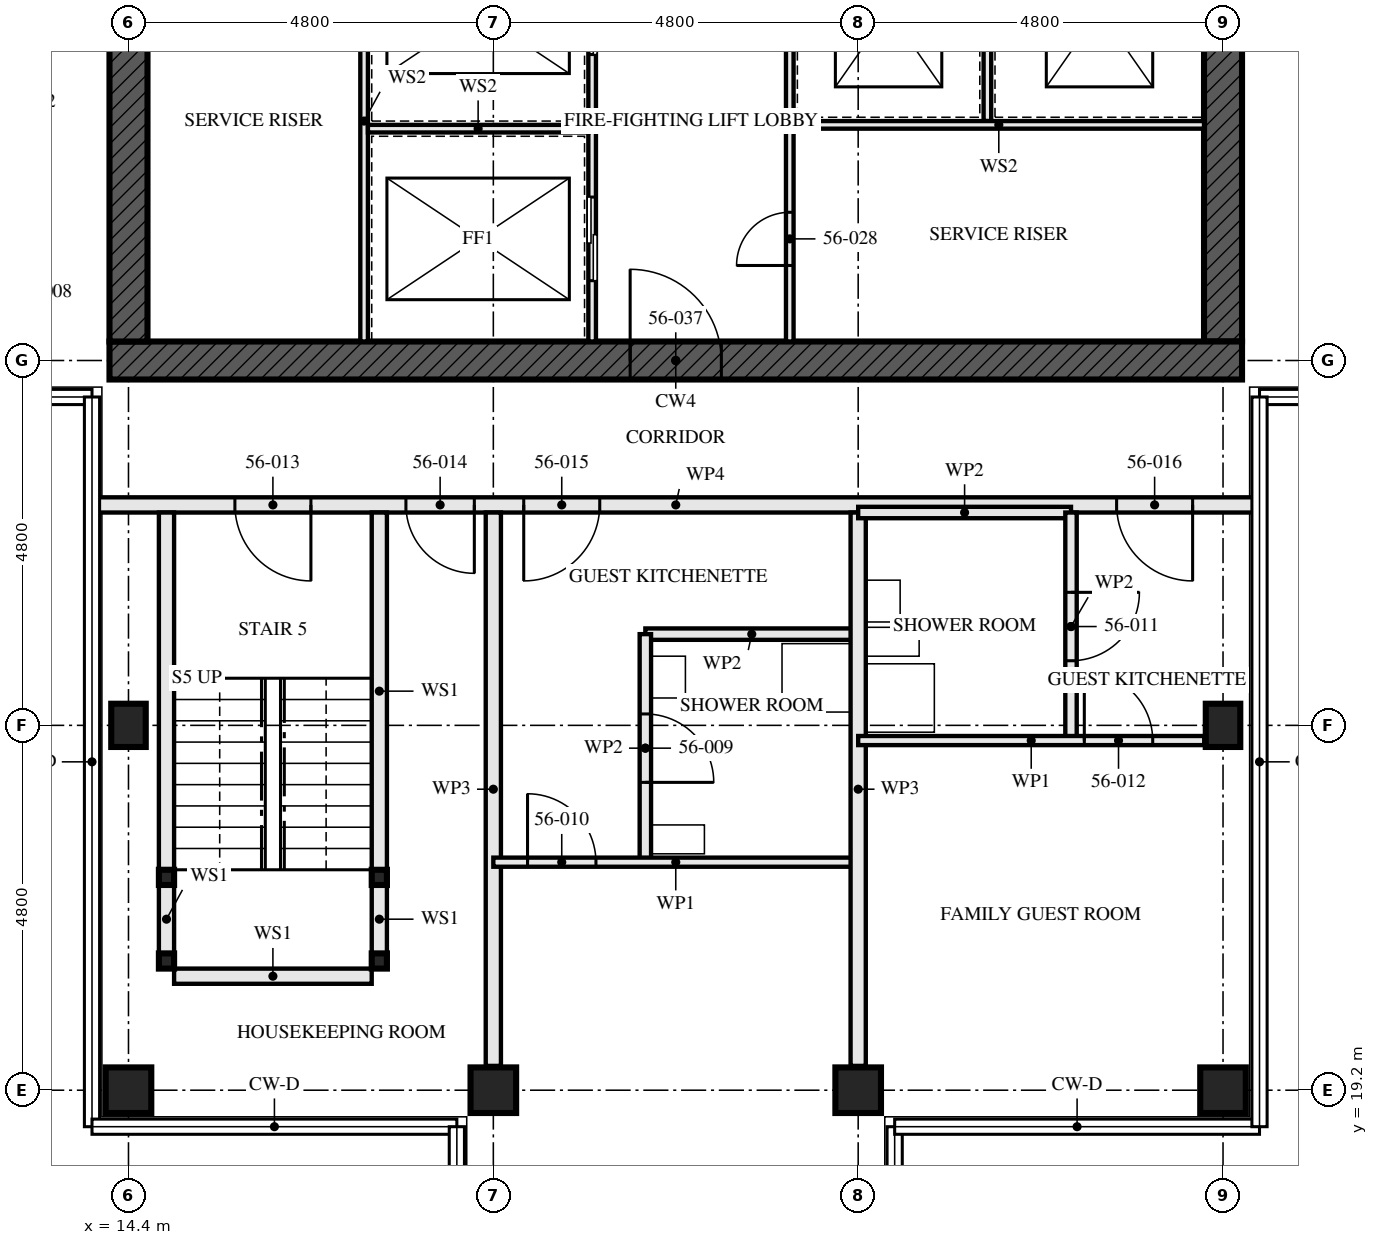
"""IFC4 building model, lengths in metres.
Left out: names, types, materials, properties, quantities, classifications, styles, units other than length and angle.
Written with IfcOpenShell. Run it as: python <this file> out.ifc"""

import sys

from ifc_helpers import new_model, si_unit, direction, frame, frame_2d, origin, origin_2d, place, context, subcontext, project, spatial, rectangle, hollow_rectangle, i_section, extrude, element, fill, save


model = new_model("IFC4")
c1 = context("Model", 3, precision=1e-05, world=origin(), true_north=direction((0.0, 1.0)))
c2 = subcontext(c1, "Body", "Model", "MODEL_VIEW")
j1 = project(units=[si_unit("LENGTHUNIT", "METRE"), si_unit("PLANEANGLEUNIT", "RADIAN")], contexts=[c1])
p1 = place(None, origin())
s1 = spatial("IfcSite", under=j1, at=p1, CompositionType="ELEMENT")
p2 = place(p1, origin())
s2 = spatial("IfcBuilding", under=s1, at=p2, CompositionType="ELEMENT")
p3 = place(p2, frame((0.0, 0.0, 205.0)))
s3 = spatial("IfcBuildingStorey", under=s2, at=p3, CompositionType="ELEMENT", Elevation=205.0)
p4 = place(p3, frame((14.4, 19.2, 0.0), z_axis=(0.0, 0.0, 1.0), x_axis=(0.0, 1.0, 0.0)))
e1 = element("IfcColumn", 1, at=p4, inside=s3, PredefinedType="COLUMN", context=c2, shape_type="SweptSolid", body=[
    extrude(hollow_rectangle(XDim=0.6, YDim=0.6, WallThickness=0.05, at=origin_2d()), origin(), (0.0, 0.0, 1.0), 3.5),
])
p5 = place(p3, frame((14.4, 24.0, 0.0), z_axis=(0.0, 0.0, 1.0), x_axis=(1.0, 0.0, 0.0)))
e2 = element("IfcColumn", 2, at=p5, inside=s3, PredefinedType="COLUMN", context=c2, shape_type="SweptSolid", body=[
    extrude(i_section(OverallWidth=0.454, OverallDepth=0.569, WebThickness=0.078, FlangeThickness=0.125, FilletRadius=0.015, at=origin_2d()), origin(), (0.0, 0.0, 1.0), 3.5),
])
for number, where, z_axis, x_axis in (
    (3, (19.2, 19.2, 0.0), (0.0, 0.0, 1.0), (0.0, 1.0, 0.0)),
    (4, (24.0, 19.2, 0.0), (0.0, 0.0, 1.0), (0.0, 1.0, 0.0)),
    (5, (28.8, 19.2, 0.0), (0.0, 0.0, 1.0), (0.0, 1.0, 0.0)),
):
    element("IfcColumn", number, at=place(p3, frame(where, z_axis=z_axis, x_axis=x_axis)), inside=s3, PredefinedType="COLUMN", context=c2, shape_type="SweptSolid", body=[
        extrude(hollow_rectangle(XDim=0.6, YDim=0.6, WallThickness=0.05, at=origin_2d()), origin(), (0.0, 0.0, 1.0), 3.5),
    ])
p6 = place(p3, frame((28.8, 24.0, 0.0), z_axis=(0.0, 0.0, 1.0), x_axis=(1.0, 0.0, 0.0)))
e6 = element("IfcColumn", 6, at=p6, inside=s3, PredefinedType="COLUMN", context=c2, shape_type="SweptSolid", body=[
    extrude(i_section(OverallWidth=0.454, OverallDepth=0.569, WebThickness=0.078, FlangeThickness=0.125, FilletRadius=0.015, at=origin_2d()), origin(), (0.0, 0.0, 1.0), 3.5),
])
p7 = place(p3, frame((14.15, 28.8, -0.17), z_axis=(0.0, 0.0, 1.0), x_axis=(1.0, 0.0, 0.0)))
e7 = element("IfcWall", 7, at=p7, inside=s3, PredefinedType="SHEAR", context=c2, shape_type="SweptSolid", body=[
    extrude(rectangle(XDim=14.9, YDim=0.5, at=frame_2d((7.45, 0.0))), origin(), (0.0, 0.0, 1.0), 3.5),
])
p8 = place(p7, frame((6.85, 0.0, 0.17)))
e8 = element("IfcOpeningElement", 8, at=p8, cuts=e7, PredefinedType="OPENING", context=c2, shape_type="SweptSolid", body=[
    extrude(rectangle(XDim=1.2, YDim=2.1, at=frame_2d((0.6, 1.05))), frame((0.0, 0.26, 0.0), z_axis=(0.0, -1.0, 0.0), x_axis=(1.0, 0.0, 0.0)), (0.0, 0.0, 1.0), 0.521),
])
p9 = place(p3, frame((14.4, 42.95, -0.17), z_axis=(0.0, 0.0, 1.0), x_axis=(0.0, -1.0, 0.0)))
e9 = element("IfcWall", 9, at=p9, inside=s3, PredefinedType="SHEAR", context=c2, shape_type="SweptSolid", body=[
    extrude(rectangle(XDim=13.9, YDim=0.5, at=frame_2d((6.95, 0.0))), origin(), (0.0, 0.0, 1.0), 3.5),
])
p10 = place(p9, frame((6.35, 0.0, 0.17)))
e10 = element("IfcOpeningElement", 10, at=p10, cuts=e9, PredefinedType="OPENING", context=c2, shape_type="SweptSolid", body=[
    extrude(rectangle(XDim=1.2, YDim=2.1, at=frame_2d((0.6, 1.05))), frame((0.0, 0.26, 0.0), z_axis=(0.0, -1.0, 0.0), x_axis=(1.0, 0.0, 0.0)), (0.0, 0.0, 1.0), 0.521),
])
p11 = place(p3, frame((28.8, 29.05, -0.17), z_axis=(0.0, 0.0, 1.0), x_axis=(0.0, 1.0, 0.0)))
e11 = element("IfcWall", 11, at=p11, inside=s3, PredefinedType="SHEAR", context=c2, shape_type="SweptSolid", body=[
    extrude(rectangle(XDim=13.9, YDim=0.5, at=frame_2d((6.95, 0.0))), origin(), (0.0, 0.0, 1.0), 3.5),
])
p12 = place(p11, frame((6.35, 0.0, 0.17)))
e12 = element("IfcOpeningElement", 12, at=p12, cuts=e11, PredefinedType="OPENING", context=c2, shape_type="SweptSolid", body=[
    extrude(rectangle(XDim=1.2, YDim=2.1, at=frame_2d((0.6, 1.05))), frame((0.0, 0.26, 0.0), z_axis=(0.0, -1.0, 0.0), x_axis=(1.0, 0.0, 0.0)), (0.0, 0.0, 1.0), 0.521),
])
for number, where, z_axis, x_axis in (
    (13, (14.9, 20.9, 0.0), (0.0, 0.0, 1.0), (1.0, 0.0, 0.0)),
    (14, (17.7, 20.9, 0.0), (0.0, 0.0, 1.0), (1.0, 0.0, 0.0)),
    (15, (14.9, 22.0, 0.0), (0.0, 0.0, 1.0), (1.0, 0.0, 0.0)),
    (16, (17.7, 22.0, 0.0), (0.0, 0.0, 1.0), (1.0, 0.0, 0.0)),
):
    element("IfcColumn", number, at=place(p3, frame(where, z_axis=z_axis, x_axis=x_axis)), inside=s3, PredefinedType="COLUMN", context=c2, shape_type="SweptSolid", body=[
        extrude(hollow_rectangle(XDim=0.2, YDim=0.2, WallThickness=0.008, at=origin_2d()), origin(), (0.0, 0.0, 1.0), 3.33),
    ])
p13 = place(p3, frame((14.9, 21.0, 0.0), z_axis=(0.0, 0.0, 1.0), x_axis=(0.0, 1.0, 0.0)))
e17 = element("IfcWall", 17, at=p13, inside=s3, PredefinedType="SOLIDWALL", context=c2, shape_type="SweptSolid", body=[
    extrude(rectangle(XDim=0.9, YDim=0.2, at=frame_2d((0.45, 0.0))), origin(), (0.0, 0.0, 1.0), 2.99),
])
p14 = place(p3, frame((14.9, 22.1, 0.0), z_axis=(0.0, 0.0, 1.0), x_axis=(0.0, 1.0, 0.0)))
e18 = element("IfcWall", 18, at=p14, inside=s3, PredefinedType="SOLIDWALL", context=c2, shape_type="SweptSolid", body=[
    extrude(rectangle(XDim=4.7, YDim=0.2, at=frame_2d((2.35, 0.0))), origin(), (0.0, 0.0, 1.0), 2.99),
])
p15 = place(p3, frame((17.7, 21.0, 0.0), z_axis=(0.0, 0.0, 1.0), x_axis=(0.0, 1.0, 0.0)))
e19 = element("IfcWall", 19, at=p15, inside=s3, PredefinedType="SOLIDWALL", context=c2, shape_type="SweptSolid", body=[
    extrude(rectangle(XDim=0.9, YDim=0.2, at=frame_2d((0.45, 0.0))), origin(), (0.0, 0.0, 1.0), 2.99),
])
p16 = place(p3, frame((17.7, 22.1, 0.0), z_axis=(0.0, 0.0, 1.0), x_axis=(0.0, 1.0, 0.0)))
e20 = element("IfcWall", 20, at=p16, inside=s3, PredefinedType="SOLIDWALL", context=c2, shape_type="SweptSolid", body=[
    extrude(rectangle(XDim=4.7, YDim=0.2, at=frame_2d((2.35, 0.0))), origin(), (0.0, 0.0, 1.0), 2.99),
])
p17 = place(p3, frame((15.0, 20.7, 0.0), z_axis=(0.0, 0.0, 1.0), x_axis=(1.0, 0.0, 0.0)))
e21 = element("IfcWall", 21, at=p17, inside=s3, PredefinedType="SOLIDWALL", context=c2, shape_type="SweptSolid", body=[
    extrude(rectangle(XDim=2.6, YDim=0.2, at=frame_2d((1.3, 0.0))), origin(), (0.0, 0.0, 1.0), 3.33),
])
p18 = place(p3, frame((19.2, 19.52, 0.0), z_axis=(0.0, 0.0, 1.0), x_axis=(0.0, 1.0, 0.0)))
e22 = element("IfcWall", 22, at=p18, inside=s3, PredefinedType="PARTITIONING", context=c2, shape_type="SweptSolid", body=[
    extrude(rectangle(XDim=7.28, YDim=0.2, at=frame_2d((3.64, 0.0))), origin(), (0.0, 0.0, 1.0), 2.55),
])
p19 = place(p3, frame((21.2, 22.2, 0.0), z_axis=(0.0, 0.0, 1.0), x_axis=(0.0, 1.0, 0.0)))
e23 = element("IfcWall", 23, at=p19, inside=s3, PredefinedType="PARTITIONING", context=c2, shape_type="SweptSolid", body=[
    extrude(rectangle(XDim=3.0, YDim=0.15, at=frame_2d((1.5, 0.0))), origin(), (0.0, 0.0, 1.0), 2.55),
])
p20 = place(p19, frame((1.05, 0.0, 0.0)))
e24 = element("IfcOpeningElement", 24, at=p20, cuts=e23, PredefinedType="OPENING", context=c2, shape_type="SweptSolid", body=[
    extrude(rectangle(XDim=0.9, YDim=2.1, at=frame_2d((0.45, 1.05))), frame((0.0, 0.085, 0.0), z_axis=(0.0, -1.0, 0.0), x_axis=(1.0, 0.0, 0.0)), (0.0, 0.0, 1.0), 0.171),
])
p21 = place(p3, frame((21.2, 25.2, 0.0), z_axis=(0.0, 0.0, 1.0), x_axis=(1.0, 0.0, 0.0)))
e25 = element("IfcWall", 25, at=p21, inside=s3, PredefinedType="PARTITIONING", context=c2, shape_type="SweptSolid", body=[
    extrude(rectangle(XDim=2.8, YDim=0.15, at=frame_2d((1.4, 0.0))), origin(), (0.0, 0.0, 1.0), 3.33),
])
p22 = place(p3, frame((19.2, 22.2, 0.0), z_axis=(0.0, 0.0, 1.0), x_axis=(1.0, 0.0, 0.0)))
e26 = element("IfcWall", 26, at=p22, inside=s3, PredefinedType="PARTITIONING", context=c2, shape_type="SweptSolid", body=[
    extrude(rectangle(XDim=4.8, YDim=0.12, at=frame_2d((2.4, 0.0))), origin(), (0.0, 0.0, 1.0), 3.33),
])
p23 = place(p22, frame((0.45, 0.0, 0.0)))
e27 = element("IfcOpeningElement", 27, at=p23, cuts=e26, PredefinedType="OPENING", context=c2, shape_type="SweptSolid", body=[
    extrude(rectangle(XDim=0.9, YDim=2.1, at=frame_2d((0.45, 1.05))), frame((0.0, 0.071, 0.0), z_axis=(0.0, -1.0, 0.0), x_axis=(1.0, 0.0, 0.0)), (0.0, 0.0, 1.0), 0.141),
])
p24 = place(p3, frame((24.0, 19.52, 0.0), z_axis=(0.0, 0.0, 1.0), x_axis=(0.0, 1.0, 0.0)))
e28 = element("IfcWall", 28, at=p24, inside=s3, PredefinedType="PARTITIONING", context=c2, shape_type="SweptSolid", body=[
    extrude(rectangle(XDim=7.28, YDim=0.2, at=frame_2d((3.64, 0.0))), origin(), (0.0, 0.0, 1.0), 2.55),
])
p25 = place(p3, frame((26.8, 23.8, 0.0), z_axis=(0.0, 0.0, 1.0), x_axis=(0.0, 1.0, 0.0)))
e29 = element("IfcWall", 29, at=p25, inside=s3, PredefinedType="PARTITIONING", context=c2, shape_type="SweptSolid", body=[
    extrude(rectangle(XDim=3.0, YDim=0.15, at=frame_2d((1.5, 0.0))), origin(), (0.0, 0.0, 1.0), 2.55),
])
p26 = place(p25, frame((1.05, 0.0, 0.0)))
e30 = element("IfcOpeningElement", 30, at=p26, cuts=e29, PredefinedType="OPENING", context=c2, shape_type="SweptSolid", body=[
    extrude(rectangle(XDim=0.9, YDim=2.1, at=frame_2d((0.45, 1.05))), frame((0.0, 0.085, 0.0), z_axis=(0.0, -1.0, 0.0), x_axis=(1.0, 0.0, 0.0)), (0.0, 0.0, 1.0), 0.171),
])
p27 = place(p3, frame((24.0, 26.8, 0.0), z_axis=(0.0, 0.0, 1.0), x_axis=(1.0, 0.0, 0.0)))
e31 = element("IfcWall", 31, at=p27, inside=s3, PredefinedType="PARTITIONING", context=c2, shape_type="SweptSolid", body=[
    extrude(rectangle(XDim=2.8, YDim=0.15, at=frame_2d((1.4, 0.0))), origin(), (0.0, 0.0, 1.0), 3.33),
])
p28 = place(p3, frame((24.0, 23.8, 0.0), z_axis=(0.0, 0.0, 1.0), x_axis=(1.0, 0.0, 0.0)))
e32 = element("IfcWall", 32, at=p28, inside=s3, PredefinedType="PARTITIONING", context=c2, shape_type="SweptSolid", body=[
    extrude(rectangle(XDim=4.553, YDim=0.12, at=frame_2d((2.276, 0.0))), origin(), (0.0, 0.0, 1.0), 3.33),
])
p29 = place(p28, frame((2.975, 0.0, 0.0)))
e33 = element("IfcOpeningElement", 33, at=p29, cuts=e32, PredefinedType="OPENING", context=c2, shape_type="SweptSolid", body=[
    extrude(rectangle(XDim=0.9, YDim=2.1, at=frame_2d((0.45, 1.05))), frame((0.0, 0.071, 0.0), z_axis=(0.0, -1.0, 0.0), x_axis=(1.0, 0.0, 0.0)), (0.0, 0.0, 1.0), 0.141),
])
p30 = place(p3, frame((13.945, 26.9, 0.0), z_axis=(0.0, 0.0, 1.0), x_axis=(1.0, 0.0, 0.0)))
e34 = element("IfcWall", 34, at=p30, inside=s3, PredefinedType="PARTITIONING", context=c2, shape_type="SweptSolid", body=[
    extrude(rectangle(XDim=15.31, YDim=0.2, at=frame_2d((7.655, 0.0))), origin(), (0.0, 0.0, 1.0), 2.32),
])
p31 = place(p30, frame((1.855, 0.0, 0.0)))
e35 = element("IfcOpeningElement", 35, at=p31, cuts=e34, PredefinedType="OPENING", context=c2, shape_type="SweptSolid", body=[
    extrude(rectangle(XDim=1.0, YDim=2.1, at=frame_2d((0.5, 1.05))), frame((0.0, 0.111, 0.0), z_axis=(0.0, -1.0, 0.0), x_axis=(1.0, 0.0, 0.0)), (0.0, 0.0, 1.0), 0.221),
])
p32 = place(p30, frame((4.105, 0.0, 0.0)))
e36 = element("IfcOpeningElement", 36, at=p32, cuts=e34, PredefinedType="OPENING", context=c2, shape_type="SweptSolid", body=[
    extrude(rectangle(XDim=0.9, YDim=2.1, at=frame_2d((0.45, 1.05))), frame((0.0, 0.111, 0.0), z_axis=(0.0, -1.0, 0.0), x_axis=(1.0, 0.0, 0.0)), (0.0, 0.0, 1.0), 0.221),
])
p33 = place(p30, frame((5.655, 0.0, 0.0)))
e37 = element("IfcOpeningElement", 37, at=p33, cuts=e34, PredefinedType="OPENING", context=c2, shape_type="SweptSolid", body=[
    extrude(rectangle(XDim=1.0, YDim=2.1, at=frame_2d((0.5, 1.05))), frame((0.0, 0.111, 0.0), z_axis=(0.0, -1.0, 0.0), x_axis=(1.0, 0.0, 0.0)), (0.0, 0.0, 1.0), 0.221),
])
p34 = place(p30, frame((13.455, 0.0, 0.0)))
e38 = element("IfcOpeningElement", 38, at=p34, cuts=e34, PredefinedType="OPENING", context=c2, shape_type="SweptSolid", body=[
    extrude(rectangle(XDim=1.0, YDim=2.1, at=frame_2d((0.5, 1.05))), frame((0.0, 0.111, 0.0), z_axis=(0.0, -1.0, 0.0), x_axis=(1.0, 0.0, 0.0)), (0.0, 0.0, 1.0), 0.221),
])
p35 = place(p3, frame((20.5, 29.05, 0.0), z_axis=(0.0, 0.0, 1.0), x_axis=(0.0, 1.0, 0.0)))
e39 = element("IfcWall", 39, at=p35, inside=s3, PredefinedType="SOLIDWALL", context=c2, shape_type="SweptSolid", body=[
    extrude(rectangle(XDim=5.8, YDim=0.1, at=frame_2d((2.9, 0.0))), origin(), (0.0, 0.0, 1.0), 3.33),
])
p36 = place(p35, frame((0.8, 0.0, 0.0)))
e40 = element("IfcOpeningElement", 40, at=p36, cuts=e39, PredefinedType="OPENING", context=c2, shape_type="SweptSolid", body=[
    extrude(rectangle(XDim=1.1, YDim=2.3, at=frame_2d((0.55, 1.15))), frame((0.0, 0.061, 0.0), z_axis=(0.0, -1.0, 0.0), x_axis=(1.0, 0.0, 0.0)), (0.0, 0.0, 1.0), 0.121),
])
p37 = place(p35, frame((3.775, 0.0, 0.0)))
e41 = element("IfcOpeningElement", 41, at=p37, cuts=e39, PredefinedType="OPENING", context=c2, shape_type="SweptSolid", body=[
    extrude(rectangle(XDim=1.1, YDim=2.3, at=frame_2d((0.55, 1.15))), frame((0.0, 0.061, 0.0), z_axis=(0.0, -1.0, 0.0), x_axis=(1.0, 0.0, 0.0)), (0.0, 0.0, 1.0), 0.121),
])
p38 = place(p3, frame((23.1, 29.05, 0.0), z_axis=(0.0, 0.0, 1.0), x_axis=(0.0, 1.0, 0.0)))
e42 = element("IfcWall", 42, at=p38, inside=s3, PredefinedType="SOLIDWALL", context=c2, shape_type="SweptSolid", body=[
    extrude(rectangle(XDim=5.8, YDim=0.1, at=frame_2d((2.9, 0.0))), origin(), (0.0, 0.0, 1.0), 3.33),
])
p39 = place(p38, frame((1.0, 0.0, 0.0)))
e43 = element("IfcOpeningElement", 43, at=p39, cuts=e42, PredefinedType="OPENING", context=c2, shape_type="SweptSolid", body=[
    extrude(rectangle(XDim=0.7, YDim=2.1, at=frame_2d((0.35, 1.05))), frame((0.0, 0.061, 0.0), z_axis=(0.0, -1.0, 0.0), x_axis=(1.0, 0.0, 0.0)), (0.0, 0.0, 1.0), 0.121),
])
p40 = place(p3, frame((17.5, 29.05, 0.0), z_axis=(0.0, 0.0, 1.0), x_axis=(0.0, 1.0, 0.0)))
e44 = element("IfcWall", 44, at=p40, inside=s3, PredefinedType="SOLIDWALL", context=c2, shape_type="SweptSolid", body=[
    extrude(rectangle(XDim=5.8, YDim=0.1, at=frame_2d((2.9, 0.0))), origin(), (0.0, 0.0, 1.0), 3.33),
])
p41 = place(p3, frame((17.55, 31.85, 0.0), z_axis=(0.0, 0.0, 1.0), x_axis=(1.0, 0.0, 0.0)))
e45 = element("IfcWall", 45, at=p41, inside=s3, PredefinedType="SOLIDWALL", context=c2, shape_type="SweptSolid", body=[
    extrude(rectangle(XDim=2.9, YDim=0.1, at=frame_2d((1.45, 0.0))), origin(), (0.0, 0.0, 1.0), 3.33),
])
p42 = place(p3, frame((25.7, 31.95, 0.0), z_axis=(0.0, 0.0, 1.0), x_axis=(0.0, 1.0, 0.0)))
e46 = element("IfcWall", 46, at=p42, inside=s3, PredefinedType="SOLIDWALL", context=c2, shape_type="SweptSolid", body=[
    extrude(rectangle(XDim=2.9, YDim=0.1, at=frame_2d((1.45, 0.0))), origin(), (0.0, 0.0, 1.0), 3.33),
])
p43 = place(p3, frame((23.15, 31.9, 0.0), z_axis=(0.0, 0.0, 1.0), x_axis=(1.0, 0.0, 0.0)))
e47 = element("IfcWall", 47, at=p43, inside=s3, PredefinedType="SOLIDWALL", context=c2, shape_type="SweptSolid", body=[
    extrude(rectangle(XDim=5.4, YDim=0.1, at=frame_2d((2.7, 0.0))), origin(), (0.0, 0.0, 1.0), 3.33),
])
p44 = place(p20, frame((0.9, 0.0, 0.0), z_axis=(0.0, 0.0, 1.0), x_axis=(-1.0, 0.0, 0.0)))
e48 = element("IfcDoor", 48, at=p44, inside=s3, OperationType="SINGLE_SWING_LEFT", PredefinedType="DOOR", context=c2, shape_type="SweptSolid", body=[
    extrude(rectangle(XDim=0.9, YDim=2.1, at=frame_2d((0.45, 1.05))), frame((0.0, 0.022, 0.0), z_axis=(0.0, -1.0, 0.0), x_axis=(1.0, 0.0, 0.0)), (0.0, 0.0, 1.0), 0.044),
])
fill(e24, e48)
p45 = place(p23, origin())
e49 = element("IfcDoor", 49, at=p45, inside=s3, OperationType="SINGLE_SWING_RIGHT", PredefinedType="DOOR", context=c2, shape_type="SweptSolid", body=[
    extrude(rectangle(XDim=0.9, YDim=2.1, at=frame_2d((0.45, 1.05))), frame((0.0, 0.022, 0.0), z_axis=(0.0, -1.0, 0.0), x_axis=(1.0, 0.0, 0.0)), (0.0, 0.0, 1.0), 0.044),
])
fill(e27, e49)
p46 = place(p26, frame((0.9, 0.0, 0.0), z_axis=(0.0, 0.0, 1.0), x_axis=(-1.0, 0.0, 0.0)))
e50 = element("IfcDoor", 50, at=p46, inside=s3, OperationType="SINGLE_SWING_RIGHT", PredefinedType="DOOR", context=c2, shape_type="SweptSolid", body=[
    extrude(rectangle(XDim=0.9, YDim=2.1, at=frame_2d((0.45, 1.05))), frame((0.0, 0.022, 0.0), z_axis=(0.0, -1.0, 0.0), x_axis=(1.0, 0.0, 0.0)), (0.0, 0.0, 1.0), 0.044),
])
fill(e30, e50)
p47 = place(p29, origin())
e51 = element("IfcDoor", 51, at=p47, inside=s3, OperationType="SINGLE_SWING_RIGHT", PredefinedType="DOOR", context=c2, shape_type="SweptSolid", body=[
    extrude(rectangle(XDim=0.9, YDim=2.1, at=frame_2d((0.45, 1.05))), frame((0.0, 0.022, 0.0), z_axis=(0.0, -1.0, 0.0), x_axis=(1.0, 0.0, 0.0)), (0.0, 0.0, 1.0), 0.044),
])
fill(e33, e51)
p48 = place(p31, frame((1.0, 0.0, 0.0), z_axis=(0.0, 0.0, 1.0), x_axis=(-1.0, 0.0, 0.0)))
e52 = element("IfcDoor", 52, at=p48, inside=s3, OperationType="SINGLE_SWING_RIGHT", PredefinedType="DOOR", context=c2, shape_type="SweptSolid", body=[
    extrude(rectangle(XDim=1.0, YDim=2.1, at=frame_2d((0.5, 1.05))), frame((0.0, 0.032, 0.0), z_axis=(0.0, -1.0, 0.0), x_axis=(1.0, 0.0, 0.0)), (0.0, 0.0, 1.0), 0.064),
])
fill(e35, e52)
p49 = place(p32, frame((0.9, 0.0, 0.0), z_axis=(0.0, 0.0, 1.0), x_axis=(-1.0, 0.0, 0.0)))
e53 = element("IfcDoor", 53, at=p49, inside=s3, OperationType="SINGLE_SWING_RIGHT", PredefinedType="DOOR", context=c2, shape_type="SweptSolid", body=[
    extrude(rectangle(XDim=0.9, YDim=2.1, at=frame_2d((0.45, 1.05))), frame((0.0, 0.027, 0.0), z_axis=(0.0, -1.0, 0.0), x_axis=(1.0, 0.0, 0.0)), (0.0, 0.0, 1.0), 0.054),
])
fill(e36, e53)
p50 = place(p33, frame((1.0, 0.0, 0.0), z_axis=(0.0, 0.0, 1.0), x_axis=(-1.0, 0.0, 0.0)))
e54 = element("IfcDoor", 54, at=p50, inside=s3, OperationType="SINGLE_SWING_LEFT", PredefinedType="DOOR", context=c2, shape_type="SweptSolid", body=[
    extrude(rectangle(XDim=1.0, YDim=2.1, at=frame_2d((0.5, 1.05))), frame((0.0, 0.027, 0.0), z_axis=(0.0, -1.0, 0.0), x_axis=(1.0, 0.0, 0.0)), (0.0, 0.0, 1.0), 0.054),
])
fill(e37, e54)
p51 = place(p34, frame((1.0, 0.0, 0.0), z_axis=(0.0, 0.0, 1.0), x_axis=(-1.0, 0.0, 0.0)))
e55 = element("IfcDoor", 55, at=p51, inside=s3, OperationType="SINGLE_SWING_RIGHT", PredefinedType="DOOR", context=c2, shape_type="SweptSolid", body=[
    extrude(rectangle(XDim=1.0, YDim=2.1, at=frame_2d((0.5, 1.05))), frame((0.0, 0.027, 0.0), z_axis=(0.0, -1.0, 0.0), x_axis=(1.0, 0.0, 0.0)), (0.0, 0.0, 1.0), 0.054),
])
fill(e38, e55)
p52 = place(p36, origin())
e56 = element("IfcDoor", 56, at=p52, inside=s3, OperationType="SLIDING_TO_LEFT", PredefinedType="DOOR", context=c2, shape_type="SweptSolid", body=[
    extrude(rectangle(XDim=1.1, YDim=2.3, at=frame_2d((0.55, 1.15))), frame((0.0, 0.05, 0.0), z_axis=(0.0, -1.0, 0.0), x_axis=(1.0, 0.0, 0.0)), (0.0, 0.0, 1.0), 0.1),
])
fill(e40, e56)
p53 = place(p37, origin())
e57 = element("IfcDoor", 57, at=p53, inside=s3, OperationType="SLIDING_TO_LEFT", PredefinedType="DOOR", context=c2, shape_type="SweptSolid", body=[
    extrude(rectangle(XDim=1.1, YDim=2.3, at=frame_2d((0.55, 1.15))), frame((0.0, 0.05, 0.0), z_axis=(0.0, -1.0, 0.0), x_axis=(1.0, 0.0, 0.0)), (0.0, 0.0, 1.0), 0.1),
])
fill(e41, e57)
p54 = place(p39, origin())
e58 = element("IfcDoor", 58, at=p54, inside=s3, OperationType="SINGLE_SWING_RIGHT", PredefinedType="DOOR", context=c2, shape_type="SweptSolid", body=[
    extrude(rectangle(XDim=0.7, YDim=2.1, at=frame_2d((0.35, 1.05))), frame((0.0, 0.027, 0.0), z_axis=(0.0, -1.0, 0.0), x_axis=(1.0, 0.0, 0.0)), (0.0, 0.0, 1.0), 0.054),
])
fill(e43, e58)
p55 = place(p8, origin())
e59 = element("IfcDoor", 59, at=p55, inside=s3, OperationType="SINGLE_SWING_LEFT", PredefinedType="DOOR", context=c2, shape_type="SweptSolid", body=[
    extrude(rectangle(XDim=1.2, YDim=2.1, at=frame_2d((0.6, 1.05))), frame((0.0, 0.027, 0.0), z_axis=(0.0, -1.0, 0.0), x_axis=(1.0, 0.0, 0.0)), (0.0, 0.0, 1.0), 0.054),
])
fill(e8, e59)
save(model, sys.argv[1])
